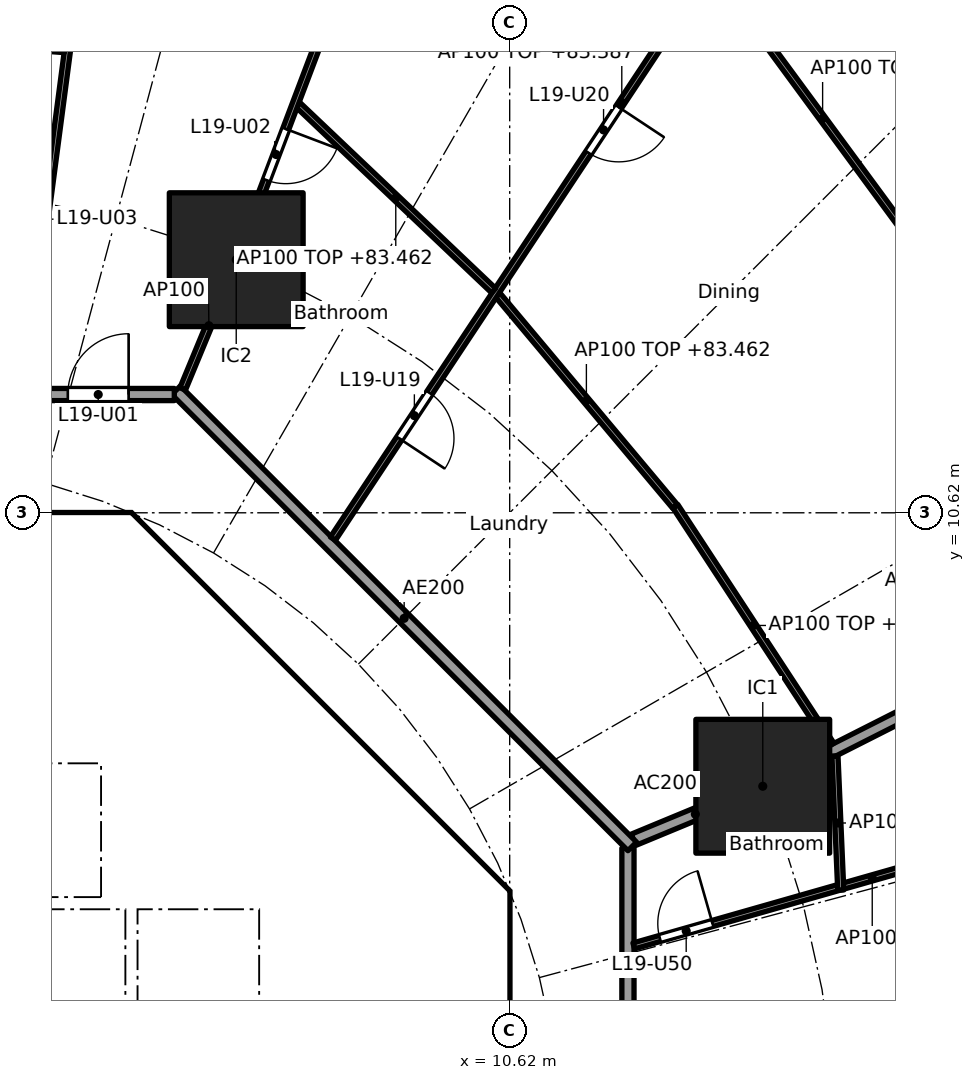
"""IFC4 building model, lengths in metres.
Left out: names, types, materials, properties, quantities, classifications, styles, units other than length and angle.
Written with IfcOpenShell. Run it as: python <this file> out.ifc"""

import sys

from ifc_helpers import new_model, si_unit, direction, frame, frame_2d, origin, origin_2d, place, context, subcontext, project, spatial, polyline, rectangle, outline, extrude, element, fill, save


model = new_model("IFC4")
c1 = context("Model", 3, precision=1e-05, world=origin(), true_north=direction((0.0, 1.0)))
c2 = subcontext(c1, "Body", "Model", "MODEL_VIEW")
j1 = project(units=[si_unit("LENGTHUNIT", "METRE"), si_unit("PLANEANGLEUNIT", "RADIAN")], contexts=[c1])
p1 = place(None, origin())
s1 = spatial("IfcSite", under=j1, at=p1, CompositionType="ELEMENT")
p2 = place(p1, origin())
s2 = spatial("IfcBuilding", under=s1, at=p2, CompositionType="ELEMENT")
p3 = place(p2, frame((0.0, 0.0, 80.7)))
s3 = spatial("IfcBuildingStorey", under=s2, at=p3, CompositionType="ELEMENT", Elevation=80.7)
for number, where, z_axis, x_axis in (
    (1, (14.782, 6.123, 0.0), (0.0, 0.0, 1.0), (1.0, 0.0, 0.0)),
    (2, (6.123, 14.782, 0.0), (0.0, 0.0, 1.0), (1.0, 0.0, 0.0)),
):
    element("IfcColumn", number, at=place(p3, frame(where, z_axis=z_axis, x_axis=x_axis)), inside=s3, PredefinedType="COLUMN", context=c2, shape_type="SweptSolid", body=[
        extrude(rectangle(XDim=2.2, YDim=2.2, at=origin_2d()), origin(), (0.0, 0.0, 1.0), 3.7),
    ])
p4 = place(p3, frame((9.988, 4.613, 0.0), z_axis=(0.0, 0.0, 1.0), x_axis=(-0.707106781187, 0.707106781187, 0.0)))
e3 = element("IfcWall", 3, at=p4, inside=s3, PredefinedType="SHEAR", context=c2, shape_type="SweptSolid", body=[
    extrude(rectangle(XDim=7.602, YDim=0.6, at=frame_2d((3.801, 0.0))), origin(), (0.0, 0.0, 1.0), 3.44),
])
p5 = place(p4, frame((3.201, 0.0, 0.0)))
e4 = element("IfcOpeningElement", 4, at=p5, cuts=e3, PredefinedType="OPENING", context=c2, shape_type="SweptSolid", body=[
    extrude(rectangle(XDim=1.2, YDim=2.1, at=frame_2d((0.6, 1.05))), frame((0.0, 0.31, 0.0), z_axis=(0.0, -1.0, 0.0), x_axis=(1.0, 0.0, 0.0)), (0.0, 0.0, 1.0), 0.62),
])
p6 = place(p3, frame((4.0, 4.3, 0.0), z_axis=(0.0, 0.0, 1.0), x_axis=(0.0, 1.0, 0.0)))
e5 = element("IfcWall", 5, at=p6, inside=s3, PredefinedType="SOLIDWALL", context=c2, shape_type="SweptSolid", body=[
    extrude(rectangle(XDim=2.2, YDim=0.2, at=frame_2d((1.1, 0.0))), origin(), (0.0, 0.0, 1.0), 3.44),
])
p7 = place(p6, frame((0.55, 0.0, 0.0)))
e6 = element("IfcOpeningElement", 6, at=p7, cuts=e5, PredefinedType="OPENING", context=c2, shape_type="SweptSolid", body=[
    extrude(rectangle(XDim=1.1, YDim=2.1, at=frame_2d((0.55, 1.05))), frame((0.0, 0.11, 0.0), z_axis=(0.0, -1.0, 0.0), x_axis=(1.0, 0.0, 0.0)), (0.0, 0.0, 1.0), 0.22),
])
p8 = place(p3, frame((6.7, 4.0, 0.0), z_axis=(0.0, 0.0, 1.0), x_axis=(1.0, 0.0, 0.0)))
e7 = element("IfcWall", 7, at=p8, inside=s3, PredefinedType="SOLIDWALL", context=c2, shape_type="SweptSolid", body=[
    extrude(rectangle(XDim=3.325, YDim=0.2, at=frame_2d((1.662, 0.0))), origin(), (0.0, 0.0, 1.0), 3.44),
])
p9 = place(p8, frame((1.25, 0.0, 0.0)))
e8 = element("IfcOpeningElement", 8, at=p9, cuts=e7, PredefinedType="OPENING", context=c2, shape_type="SweptSolid", body=[
    extrude(rectangle(XDim=1.1, YDim=2.1, at=frame_2d((0.55, 1.05))), frame((0.0, 0.11, 0.0), z_axis=(0.0, -1.0, 0.0), x_axis=(1.0, 0.0, 0.0)), (0.0, 0.0, 1.0), 0.22),
])
p10 = place(p3, frame((4.0, 7.025, 0.0), z_axis=(0.0, 0.0, 1.0), x_axis=(0.0, 1.0, 0.0)))
e9 = element("IfcWall", 9, at=p10, inside=s3, PredefinedType="SOLIDWALL", context=c2, shape_type="SweptSolid", body=[
    extrude(rectangle(XDim=3.0, YDim=0.2, at=frame_2d((1.5, 0.0))), origin(), (0.0, 0.0, 1.0), 3.44),
])
p11 = place(p10, frame((0.925, 0.0, 0.0)))
e10 = element("IfcOpeningElement", 10, at=p11, cuts=e9, PredefinedType="OPENING", context=c2, shape_type="SweptSolid", body=[
    extrude(rectangle(XDim=1.1, YDim=2.1, at=frame_2d((0.55, 1.05))), frame((0.0, 0.11, 0.0), z_axis=(0.0, -1.0, 0.0), x_axis=(1.0, 0.0, 0.0)), (0.0, 0.0, 1.0), 0.22),
])
p12 = place(p3, origin())
e11 = element("IfcWall", 11, at=p12, inside=s3, PredefinedType="SHEAR", context=c2, shape_type="SweptSolid", body=[
    extrude(outline(polyline([(-4.152, 10.025), (-4.401, 9.776), (-4.825, 10.2), (-4.401, 10.625), (4.401, 10.625), (4.825, 10.2), (4.401, 9.776), (4.152, 10.025), (-4.152, 10.025)])), origin(), (0.0, 0.0, 1.0), 3.44),
])
p13 = place(p3, origin())
e12 = element("IfcWall", 12, at=p13, inside=s3, PredefinedType="SHEAR", context=c2, shape_type="SweptSolid", body=[
    extrude(outline(polyline([(9.776, -4.401), (10.025, -4.152), (10.025, -3.801), (10.025, 4.152), (9.776, 4.401), (10.2, 4.825), (10.625, 4.401), (10.625, -4.401), (10.2, -4.825), (9.776, -4.401)])), origin(), (0.0, 0.0, 1.0), 3.44),
])
p14 = place(p3, origin())
e13 = element("IfcWall", 13, at=p14, inside=s3, PredefinedType="SOLIDWALL", context=c2, shape_type="SweptSolid", body=[
    extrude(outline(polyline([(-6.5, 2.1), (-6.7, 2.1), (-6.7, 4.3), (6.7, 4.3), (6.7, 2.1), (6.5, 2.1), (6.5, 4.1), (4.5, 4.1), (4.5, 2.1), (4.3, 2.1), (4.3, 4.1), (2.3, 4.1), (2.3, 2.1), (2.1, 2.1), (2.1, 4.1), (0.1, 4.1), (0.1, 2.1), (-0.1, 2.1), (-0.1, 4.1), (-2.1, 4.1), (-2.1, 2.1), (-2.3, 2.1), (-2.3, 4.1), (-4.3, 4.1), (-4.3, 2.1), (-4.5, 2.1), (-4.5, 4.1), (-6.5, 4.1), (-6.5, 2.1)])), origin(), (0.0, 0.0, 1.0), 3.44),
])
p15 = place(p3, origin())
e14 = element("IfcWall", 14, at=p15, inside=s3, PredefinedType="SOLIDWALL", context=c2, shape_type="SweptSolid", body=[
    extrude(outline(polyline([(4.1, 6.5), (-4.1, 6.5), (-4.1, 7.025), (4.1, 7.025), (4.1, 6.5)])), origin(), (0.0, 0.0, 1.0), 3.44),
])
p16 = place(p3, origin())
e15 = element("IfcWall", 15, at=p16, inside=s3, PredefinedType="SOLIDWALL", context=c2, shape_type="SweptSolid", body=[
    extrude(outline(polyline([(7.025, -3.9), (6.7, -3.9), (6.7, 3.9), (7.025, 3.9), (7.025, -3.9)])), origin(), (0.0, 0.0, 1.0), 3.44),
])
p17 = place(p3, frame((12.657, 5.243, 0.0), z_axis=(0.0, 0.0, 1.0), x_axis=(0.923876145736, 0.382691608661, 0.0)))
e16 = element("IfcWall", 16, at=p17, inside=s3, PredefinedType="PARTITIONING", context=c2, shape_type="SweptSolid", body=[
    extrude(rectangle(XDim=2.2, YDim=0.2, at=frame_2d((1.1, 0.0))), origin(), (0.0, 0.0, 1.0), 3.44),
])
p18 = place(p3, frame((14.827, 6.146, 0.0), z_axis=(0.0, 0.0, 1.0), x_axis=(0.892068075337, 0.451901038906, 0.0)))
e17 = element("IfcWall", 17, at=p18, inside=s3, PredefinedType="PARTITIONING", context=c2, shape_type="SweptSolid", body=[
    extrude(rectangle(XDim=10.32, YDim=0.2, at=frame_2d((5.16, 0.0))), origin(), (0.0, 0.0, 1.0), 2.762),
])
p19 = place(p3, frame((12.565, -5.104, 0.0), z_axis=(0.0, 0.0, 1.0), x_axis=(0.0, 1.0, 0.0)))
e18 = element("IfcWall", 18, at=p19, inside=s3, PredefinedType="PARTITIONING", context=c2, shape_type="SweptSolid", body=[
    extrude(rectangle(XDim=10.209, YDim=0.2, at=frame_2d((5.104, 0.0))), origin(), (0.0, 0.0, 1.0), 3.44),
])
p20 = place(p19, frame((6.339, 0.0, 0.0)))
e19 = element("IfcOpeningElement", 19, at=p20, cuts=e18, PredefinedType="OPENING", context=c2, shape_type="SweptSolid", body=[
    extrude(rectangle(XDim=1.0, YDim=2.1, at=frame_2d((0.5, 1.05))), frame((0.0, 0.11, 0.0), z_axis=(0.0, -1.0, 0.0), x_axis=(1.0, 0.0, 0.0)), (0.0, 0.0, 1.0), 0.22),
])
p21 = place(p3, frame((12.635, 5.134, 0.0), z_axis=(0.0, 0.0, 1.0), x_axis=(-0.707106781187, 0.707106781187, 0.0)))
e20 = element("IfcWall", 20, at=p21, inside=s3, PredefinedType="PARTITIONING", context=c2, shape_type="SweptSolid", body=[
    extrude(rectangle(XDim=10.609, YDim=0.2, at=frame_2d((5.305, 0.0))), origin(), (0.0, 0.0, 1.0), 3.44),
])
p22 = place(p3, frame((5.104, 12.565, 0.0), z_axis=(0.0, 0.0, 1.0), x_axis=(-1.0, 0.0, 0.0)))
e21 = element("IfcWall", 21, at=p22, inside=s3, PredefinedType="PARTITIONING", context=c2, shape_type="SweptSolid", body=[
    extrude(rectangle(XDim=10.409, YDim=0.2, at=frame_2d((5.205, 0.0))), origin(), (0.0, 0.0, 1.0), 3.44),
])
p23 = place(p22, frame((0.751, 0.0, 0.0)))
e22 = element("IfcOpeningElement", 22, at=p23, cuts=e21, PredefinedType="OPENING", context=c2, shape_type="SweptSolid", body=[
    extrude(rectangle(XDim=1.0, YDim=2.1, at=frame_2d((0.5, 1.05))), frame((0.0, 0.11, 0.0), z_axis=(0.0, -1.0, 0.0), x_axis=(1.0, 0.0, 0.0)), (0.0, 0.0, 1.0), 0.22),
])
p24 = place(p3, frame((12.661, 3.497, 0.0), z_axis=(0.0, 0.0, 1.0), x_axis=(0.961626678623, 0.274361314621, 0.0)))
e23 = element("IfcWall", 23, at=p24, inside=s3, PredefinedType="PARTITIONING", context=c2, shape_type="SweptSolid", body=[
    extrude(rectangle(XDim=8.156, YDim=0.1, at=frame_2d((4.078, 0.0))), origin(), (0.0, 0.0, 1.0), 2.687),
])
p25 = place(p24, frame((0.446, 0.0, 0.0)))
e24 = element("IfcOpeningElement", 24, at=p25, cuts=e23, PredefinedType="OPENING", context=c2, shape_type="SweptSolid", body=[
    extrude(rectangle(XDim=0.9, YDim=2.1, at=frame_2d((0.45, 1.05))), frame((0.0, 0.06, 0.0), z_axis=(0.0, -1.0, 0.0), x_axis=(1.0, 0.0, 0.0)), (0.0, 0.0, 1.0), 0.12),
])
p26 = place(p24, frame((5.39, 0.0, 0.0)))
e25 = element("IfcOpeningElement", 25, at=p26, cuts=e23, PredefinedType="OPENING", context=c2, shape_type="SweptSolid", body=[
    extrude(rectangle(XDim=0.9, YDim=2.1, at=frame_2d((0.45, 1.05))), frame((0.0, 0.06, 0.0), z_axis=(0.0, -1.0, 0.0), x_axis=(1.0, 0.0, 0.0)), (0.0, 0.0, 1.0), 0.12),
])
p27 = place(p3, frame((16.064, 4.415, 0.0), z_axis=(0.0, 0.0, 1.0), x_axis=(-0.043101501373, 0.999070698489, 0.0)))
e26 = element("IfcWall", 26, at=p27, inside=s3, PredefinedType="PARTITIONING", context=c2, shape_type="SweptSolid", body=[
    extrude(rectangle(XDim=2.209, YDim=0.1, at=frame_2d((1.104, 0.0))), origin(), (0.0, 0.0, 1.0), 3.44),
])
p28 = place(p3, frame((15.91, 6.806, 0.0), z_axis=(0.0, 0.0, 1.0), x_axis=(-0.547468243486, 0.836826458936, 0.0)))
e27 = element("IfcWall", 27, at=p28, inside=s3, PredefinedType="PARTITIONING", context=c2, shape_type="SweptSolid", body=[
    extrude(rectangle(XDim=4.688, YDim=0.1, at=frame_2d((2.344, 0.0))), origin(), (0.0, 0.0, 1.0), 2.762),
])
p29 = place(p3, frame((13.339, 10.725, 0.0), z_axis=(0.0, 0.0, 1.0), x_axis=(-0.642515455924, 0.766272724882, 0.0)))
e28 = element("IfcWall", 28, at=p29, inside=s3, PredefinedType="PARTITIONING", context=c2, shape_type="SweptSolid", body=[
    extrude(rectangle(XDim=4.537, YDim=0.1, at=frame_2d((2.269, 0.0))), origin(), (0.0, 0.0, 1.0), 2.762),
])
p30 = place(p3, frame((17.567, 14.653, 0.0), z_axis=(0.0, 0.0, 1.0), x_axis=(-0.592391983588, 0.80564988536, 0.0)))
e29 = element("IfcWall", 29, at=p30, inside=s3, PredefinedType="PARTITIONING", context=c2, shape_type="SweptSolid", body=[
    extrude(rectangle(XDim=6.08, YDim=0.1, at=frame_2d((3.04, 0.0))), origin(), (0.0, 0.0, 1.0), 2.762),
])
p31 = place(p3, frame((7.713, 10.195, 0.0), z_axis=(0.0, 0.0, 1.0), x_axis=(0.552111071171, 0.833770571015, 0.0)))
e30 = element("IfcWall", 30, at=p31, inside=s3, PredefinedType="PARTITIONING", context=c2, shape_type="SweptSolid", body=[
    extrude(rectangle(XDim=17.208, YDim=0.1, at=frame_2d((8.604, 0.0))), origin(), (0.0, 0.0, 1.0), 2.687),
])
p32 = place(p31, frame((1.976, 0.0, 0.0)))
e31 = element("IfcOpeningElement", 31, at=p32, cuts=e30, PredefinedType="OPENING", context=c2, shape_type="SweptSolid", body=[
    extrude(rectangle(XDim=0.9, YDim=2.1, at=frame_2d((0.45, 1.05))), frame((0.0, 0.06, 0.0), z_axis=(0.0, -1.0, 0.0), x_axis=(1.0, 0.0, 0.0)), (0.0, 0.0, 1.0), 0.12),
])
p33 = place(p31, frame((7.611, 0.0, 0.0)))
e32 = element("IfcOpeningElement", 32, at=p33, cuts=e30, PredefinedType="OPENING", context=c2, shape_type="SweptSolid", body=[
    extrude(rectangle(XDim=0.9, YDim=2.1, at=frame_2d((0.45, 1.05))), frame((0.0, 0.06, 0.0), z_axis=(0.0, -1.0, 0.0), x_axis=(1.0, 0.0, 0.0)), (0.0, 0.0, 1.0), 0.12),
])
p34 = place(p3, frame((10.355, 14.274, 0.0), z_axis=(0.0, 0.0, 1.0), x_axis=(-0.725219204328, 0.688518050361, 0.0)))
e33 = element("IfcWall", 33, at=p34, inside=s3, PredefinedType="PARTITIONING", context=c2, shape_type="SweptSolid", body=[
    extrude(rectangle(XDim=4.437, YDim=0.1, at=frame_2d((2.219, 0.0))), origin(), (0.0, 0.0, 1.0), 2.762),
])
p35 = place(p3, frame((5.243, 12.657, 0.0), z_axis=(0.0, 0.0, 1.0), x_axis=(0.382719158442, 0.923864733477, 0.0)))
e34 = element("IfcWall", 34, at=p35, inside=s3, PredefinedType="PARTITIONING", context=c2, shape_type="SweptSolid", body=[
    extrude(rectangle(XDim=2.25, YDim=0.1, at=frame_2d((1.125, 0.0))), origin(), (0.0, 0.0, 1.0), 3.44),
])
p36 = place(p3, frame((6.141, 14.829, 0.0), z_axis=(0.0, 0.0, 1.0), x_axis=(0.354477134193, 0.935064682968, 0.0)))
e35 = element("IfcWall", 35, at=p36, inside=s3, PredefinedType="PARTITIONING", context=c2, shape_type="SweptSolid", body=[
    extrude(rectangle(XDim=15.626, YDim=0.1, at=frame_2d((7.813, 0.0))), origin(), (0.0, 0.0, 1.0), 2.762),
])
p37 = place(p36, frame((1.35, 0.0, 0.0)))
e36 = element("IfcOpeningElement", 36, at=p37, cuts=e35, PredefinedType="OPENING", context=c2, shape_type="SweptSolid", body=[
    extrude(rectangle(XDim=0.9, YDim=2.1, at=frame_2d((0.45, 1.05))), frame((0.0, 0.06, 0.0), z_axis=(0.0, -1.0, 0.0), x_axis=(1.0, 0.0, 0.0)), (0.0, 0.0, 1.0), 0.12),
])
p38 = place(p36, frame((5.606, 0.0, 0.0)))
e37 = element("IfcOpeningElement", 37, at=p38, cuts=e35, PredefinedType="OPENING", context=c2, shape_type="SweptSolid", body=[
    extrude(rectangle(XDim=0.9, YDim=2.1, at=frame_2d((0.45, 1.05))), frame((0.0, 0.06, 0.0), z_axis=(0.0, -1.0, 0.0), x_axis=(1.0, 0.0, 0.0)), (0.0, 0.0, 1.0), 0.12),
])
p39 = place(p3, frame((2.615, 12.664, 0.0), z_axis=(0.0, 0.0, 1.0), x_axis=(0.130614967904, 0.99143316979, 0.0)))
e38 = element("IfcWall", 38, at=p39, inside=s3, PredefinedType="PARTITIONING", context=c2, shape_type="SweptSolid", body=[
    extrude(rectangle(XDim=20.034, YDim=0.1, at=frame_2d((10.017, 0.0))), origin(), (0.0, 0.0, 1.0), 2.687),
])
p40 = place(p39, frame((2.359, 0.0, 0.0)))
e39 = element("IfcOpeningElement", 39, at=p40, cuts=e38, PredefinedType="OPENING", context=c2, shape_type="SweptSolid", body=[
    extrude(rectangle(XDim=0.9, YDim=2.1, at=frame_2d((0.45, 1.05))), frame((0.0, 0.06, 0.0), z_axis=(0.0, -1.0, 0.0), x_axis=(1.0, 0.0, 0.0)), (0.0, 0.0, 1.0), 0.12),
])
p41 = place(p39, frame((8.873, 0.0, 0.0)))
e40 = element("IfcOpeningElement", 40, at=p41, cuts=e38, PredefinedType="OPENING", context=c2, shape_type="SweptSolid", body=[
    extrude(rectangle(XDim=0.9, YDim=2.1, at=frame_2d((0.45, 1.05))), frame((0.0, 0.06, 0.0), z_axis=(0.0, -1.0, 0.0), x_axis=(1.0, 0.0, 0.0)), (0.0, 0.0, 1.0), 0.12),
])
p42 = place(p3, frame((3.299, 18.237, 0.0), z_axis=(0.0, 0.0, 1.0), x_axis=(-0.997152243414, 0.075414875552, 0.0)))
e41 = element("IfcWall", 41, at=p42, inside=s3, PredefinedType="PARTITIONING", context=c2, shape_type="SweptSolid", body=[
    extrude(rectangle(XDim=3.846, YDim=0.1, at=frame_2d((1.923, 0.0))), origin(), (0.0, 0.0, 1.0), 2.762),
])
p43 = place(p7, origin())
e42 = element("IfcDoor", 42, at=p43, inside=s3, OperationType="DOUBLE_DOOR_SLIDING", PredefinedType="DOOR", context=c2, shape_type="SweptSolid", body=[
    extrude(rectangle(XDim=1.1, YDim=2.1, at=frame_2d((0.55, 1.05))), frame((0.0, 0.025, 0.0), z_axis=(0.0, -1.0, 0.0), x_axis=(1.0, 0.0, 0.0)), (0.0, 0.0, 1.0), 0.05),
])
fill(e6, e42)
p44 = place(p9, frame((1.1, 0.0, 0.0), x_axis=(-1.0, 0.0, 0.0)))
e43 = element("IfcDoor", 43, at=p44, inside=s3, OperationType="SINGLE_SWING_RIGHT", PredefinedType="DOOR", context=c2, shape_type="SweptSolid", body=[
    extrude(rectangle(XDim=1.1, YDim=2.1, at=frame_2d((0.55, 1.05))), frame((0.0, 0.025, 0.0), z_axis=(0.0, -1.0, 0.0), x_axis=(1.0, 0.0, 0.0)), (0.0, 0.0, 1.0), 0.05),
])
fill(e8, e43)
p45 = place(p11, origin())
e44 = element("IfcDoor", 44, at=p45, inside=s3, OperationType="SINGLE_SWING_LEFT", PredefinedType="DOOR", context=c2, shape_type="SweptSolid", body=[
    extrude(rectangle(XDim=1.1, YDim=2.1, at=frame_2d((0.55, 1.05))), frame((0.0, 0.025, 0.0), z_axis=(0.0, -1.0, 0.0), x_axis=(1.0, 0.0, 0.0)), (0.0, 0.0, 1.0), 0.05),
])
fill(e10, e44)
p46 = place(p5, origin())
e45 = element("IfcDoor", 45, at=p46, inside=s3, OperationType="SINGLE_SWING_LEFT", PredefinedType="DOOR", context=c2, shape_type="SweptSolid", body=[
    extrude(rectangle(XDim=1.2, YDim=2.1, at=frame_2d((0.6, 1.05))), frame((0.0, 0.025, 0.0), z_axis=(0.0, -1.0, 0.0), x_axis=(1.0, 0.0, 0.0)), (0.0, 0.0, 1.0), 0.05),
])
fill(e4, e45)
p47 = place(p23, frame((1.0, 0.0, 0.0), x_axis=(-1.0, 0.0, 0.0)))
e46 = element("IfcDoor", 46, at=p47, inside=s3, OperationType="SINGLE_SWING_RIGHT", PredefinedType="DOOR", context=c2, shape_type="SweptSolid", body=[
    extrude(rectangle(XDim=1.0, YDim=2.1, at=frame_2d((0.5, 1.05))), frame((0.0, 0.025, 0.0), z_axis=(0.0, -1.0, 0.0), x_axis=(1.0, 0.0, 0.0)), (0.0, 0.0, 1.0), 0.05),
])
fill(e22, e46)
p48 = place(p37, frame((0.9, 0.0, 0.0), x_axis=(-1.0, 0.0, 0.0)))
e47 = element("IfcDoor", 47, at=p48, inside=s3, OperationType="SINGLE_SWING_LEFT", PredefinedType="DOOR", context=c2, shape_type="SweptSolid", body=[
    extrude(rectangle(XDim=0.9, YDim=2.1, at=frame_2d((0.45, 1.05))), frame((0.0, 0.025, 0.0), z_axis=(0.0, -1.0, 0.0), x_axis=(1.0, 0.0, 0.0)), (0.0, 0.0, 1.0), 0.05),
])
fill(e36, e47)
p49 = place(p32, frame((0.9, 0.0, 0.0), x_axis=(-1.0, 0.0, 0.0)))
e48 = element("IfcDoor", 48, at=p49, inside=s3, OperationType="SINGLE_SWING_RIGHT", PredefinedType="DOOR", context=c2, shape_type="SweptSolid", body=[
    extrude(rectangle(XDim=0.9, YDim=2.1, at=frame_2d((0.45, 1.05))), frame((0.0, 0.025, 0.0), z_axis=(0.0, -1.0, 0.0), x_axis=(1.0, 0.0, 0.0)), (0.0, 0.0, 1.0), 0.05),
])
fill(e31, e48)
p50 = place(p33, frame((0.9, 0.0, 0.0), x_axis=(-1.0, 0.0, 0.0)))
e49 = element("IfcDoor", 49, at=p50, inside=s3, OperationType="SINGLE_SWING_LEFT", PredefinedType="DOOR", context=c2, shape_type="SweptSolid", body=[
    extrude(rectangle(XDim=0.9, YDim=2.1, at=frame_2d((0.45, 1.05))), frame((0.0, 0.025, 0.0), z_axis=(0.0, -1.0, 0.0), x_axis=(1.0, 0.0, 0.0)), (0.0, 0.0, 1.0), 0.05),
])
fill(e32, e49)
p51 = place(p25, origin())
e50 = element("IfcDoor", 50, at=p51, inside=s3, OperationType="SINGLE_SWING_RIGHT", PredefinedType="DOOR", context=c2, shape_type="SweptSolid", body=[
    extrude(rectangle(XDim=0.9, YDim=2.1, at=frame_2d((0.45, 1.05))), frame((0.0, 0.025, 0.0), z_axis=(0.0, -1.0, 0.0), x_axis=(1.0, 0.0, 0.0)), (0.0, 0.0, 1.0), 0.05),
])
fill(e24, e50)
save(model, sys.argv[1])
